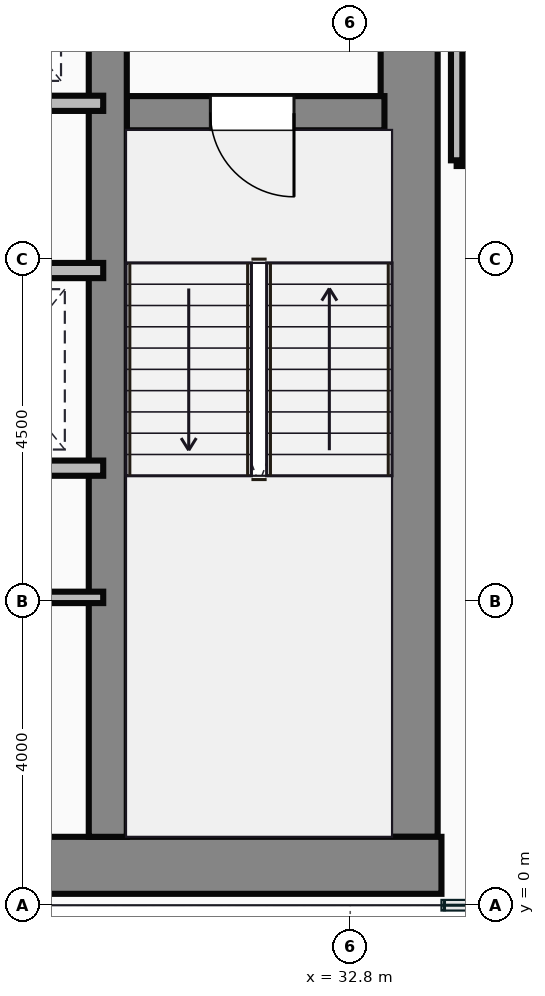
"""IFC4 building model, lengths in metres.
Left out: names, types, materials, properties, quantities, classifications, styles, units other than length and angle.
Written with IfcOpenShell. Run it as: python <this file> out.ifc"""

import sys

from ifc_helpers import new_model, si_unit, direction, frame, frame_2d, origin, place, context, subcontext, project, spatial, rectangle, extrude, source, transform, mapped, element, fill, save


model = new_model("IFC4")
c1 = context("Model", 3, precision=1e-05, world=origin(), true_north=direction((0.0, 1.0)))
c2 = subcontext(c1, "Body", "Model", "MODEL_VIEW")
j1 = project(units=[si_unit("LENGTHUNIT", "METRE"), si_unit("PLANEANGLEUNIT", "RADIAN")], contexts=[c1])
p1 = place(None, origin())
s1 = spatial("IfcSite", under=j1, at=p1, CompositionType="ELEMENT")
p2 = place(p1, origin())
s2 = spatial("IfcBuilding", under=s1, at=p2, CompositionType="ELEMENT")
p3 = place(p2, frame((0.0, 0.0, 180.75)))
s3 = spatial("IfcBuildingStorey", under=s2, at=p3, CompositionType="ELEMENT", Elevation=180.75)
m1 = source(origin(), c2, "Body", "SweptSolid", [
    extrude(rectangle(XDim=29.5, YDim=0.75, at=frame_2d((14.75, 0.0))), origin(), (0.0, 0.0, 1.0), 3.65),
])
p4 = place(p3, frame((4.5, 0.525, 0.0), z_axis=(0.0, 0.0, 1.0), x_axis=(1.0, 0.0, 0.0)))
e1 = element("IfcWall", 1, at=p4, inside=s3, PredefinedType="SHEAR", context=c2, shape_type="MappedRepresentation", body=[
    mapped(m1, transform((0.0, 0.0, 0.0))),
])
m2 = source(origin(), c2, "Body", "SweptSolid", [
    extrude(rectangle(XDim=13.1, YDim=0.75, at=frame_2d((6.55, 0.0))), origin(), (0.0, 0.0, 1.0), 3.65),
])
p5 = place(p3, frame((33.575, 0.9, 0.0), z_axis=(0.0, 0.0, 1.0), x_axis=(0.0, 1.0, 0.0)))
e2 = element("IfcWall", 2, at=p5, inside=s3, PredefinedType="SHEAR", context=c2, shape_type="MappedRepresentation", body=[
    mapped(m2, transform((0.0, 0.0, 0.0))),
])
m3 = source(origin(), c2, "Body", "SweptSolid", [
    extrude(rectangle(XDim=12.35, YDim=0.5, at=frame_2d((6.175, 0.0))), origin(), (0.0, 0.0, 1.0), 3.65),
])
p6 = place(p3, frame((29.61, 0.9, 0.0), z_axis=(0.0, 0.0, 1.0), x_axis=(0.0, 1.0, 0.0)))
e3 = element("IfcWall", 3, at=p6, inside=s3, PredefinedType="SHEAR", context=c2, shape_type="MappedRepresentation", body=[
    mapped(m3, transform((0.0, 0.0, 0.0))),
])
m4 = source(origin(), c2, "Body", "SweptSolid", [
    extrude(rectangle(XDim=3.39, YDim=0.45, at=frame_2d((1.695, 0.0))), origin(), (0.0, 0.0, 1.0), 3.65),
])
p7 = place(p3, frame((29.86, 10.42, 0.0), z_axis=(0.0, 0.0, 1.0), x_axis=(1.0, 0.0, 0.0)))
e4 = element("IfcWall", 4, at=p7, inside=s3, PredefinedType="SHEAR", context=c2, shape_type="MappedRepresentation", body=[
    mapped(m4, transform((0.0, 0.0, 0.0))),
])
p8 = place(p7, frame((1.1, 0.0, 0.0)))
e5 = element("IfcOpeningElement", 5, at=p8, cuts=e4, PredefinedType="OPENING", context=c2, shape_type="SweptSolid", body=[
    extrude(rectangle(XDim=1.1, YDim=2.15, at=frame_2d((0.55, 1.075))), frame((0.0, 0.235, 0.0), z_axis=(0.0, -1.0, 0.0), x_axis=(1.0, 0.0, 0.0)), (0.0, 0.0, 1.0), 0.47),
])
m5 = source(origin(), c2, "Body", "SweptSolid", [
    extrude(rectangle(XDim=8.8, YDim=0.2, at=frame_2d((4.4, 0.0))), origin(), (0.0, 0.0, 1.0), 3.4),
])
p9 = place(p3, frame((20.75, 10.55, 0.0), z_axis=(0.0, 0.0, 1.0), x_axis=(1.0, 0.0, 0.0)))
e6 = element("IfcWall", 6, at=p9, inside=s3, PredefinedType="PARTITIONING", context=c2, shape_type="MappedRepresentation", body=[
    mapped(m5, transform((0.0, 0.0, 0.0))),
])
m6 = source(origin(), c2, "Body", "SweptSolid", [
    extrude(rectangle(XDim=4.55, YDim=0.2, at=frame_2d((2.275, 0.0))), origin(), (0.0, 0.0, 1.0), 3.4),
])
for number, where, z_axis, x_axis in (
    (7, (25.0, 8.35, 0.0), (0.0, 0.0, 1.0), (1.0, 0.0, 0.0)),
    (8, (25.0, 5.75, 0.0), (0.0, 0.0, 1.0), (1.0, 0.0, 0.0)),
):
    element("IfcWall", number, at=place(p3, frame(where, z_axis=z_axis, x_axis=x_axis)), inside=s3, PredefinedType="PARTITIONING", context=c2, shape_type="MappedRepresentation", body=[
        mapped(m6, transform((0.0, 0.0, 0.0))),
    ])
m7 = source(origin(), c2, "Body", "SweptSolid", [
    extrude(rectangle(XDim=4.55, YDim=0.15, at=frame_2d((2.275, 0.0))), origin(), (0.0, 0.0, 1.0), 3.4),
])
p10 = place(p3, frame((25.0, 4.05, 0.0), z_axis=(0.0, 0.0, 1.0), x_axis=(1.0, 0.0, 0.0)))
e9 = element("IfcWall", 9, at=p10, inside=s3, PredefinedType="PARTITIONING", context=c2, shape_type="MappedRepresentation", body=[
    mapped(m7, transform((0.0, 0.0, 0.0))),
])
m8 = source(origin(), c2, "Body", "SweptSolid", [
    extrude(rectangle(XDim=4.8, YDim=0.15, at=frame_2d((2.4, 0.0))), origin(), (0.0, 0.0, 1.0), 3.4),
])
p11 = place(p3, frame((34.2, 9.8, 0.0), z_axis=(0.0, 0.0, 1.0), x_axis=(1.0, 0.0, 0.0)))
e10 = element("IfcWall", 10, at=p11, inside=s3, PredefinedType="PARTITIONING", context=c2, shape_type="MappedRepresentation", body=[
    mapped(m8, transform((0.0, 0.0, 0.0))),
])
m9 = source(origin(), c2, "Body", "SweptSolid", [
    extrude(rectangle(XDim=4.18, YDim=0.15, at=frame_2d((2.09, 0.0))), origin(), (0.0, 0.0, 1.0), 3.4),
])
p12 = place(p3, frame((34.2, 9.8, 0.0), z_axis=(0.0, 0.0, 1.0), x_axis=(0.0, 1.0, 0.0)))
e11 = element("IfcWall", 11, at=p12, inside=s3, PredefinedType="PARTITIONING", context=c2, shape_type="MappedRepresentation", body=[
    mapped(m9, transform((0.0, 0.0, 0.0))),
])
m10 = source(origin(), c2, "Body", "SweptSolid", [
    extrude(rectangle(XDim=1.1, YDim=2.15, at=frame_2d((0.55, 1.075))), frame((0.0, 0.025, 0.0), z_axis=(0.0, -1.0, 0.0), x_axis=(1.0, 0.0, 0.0)), (0.0, 0.0, 1.0), 0.05),
])
p13 = place(p8, frame((1.1, 0.0, 0.0), z_axis=(0.0, 0.0, 1.0), x_axis=(-1.0, 0.0, 0.0)))
e12 = element("IfcDoor", 12, at=p13, inside=s3, OperationType="SINGLE_SWING_RIGHT", PredefinedType="DOOR", context=c2, shape_type="MappedRepresentation", body=[
    mapped(m10, transform((0.0, 0.0, 0.0))),
])
fill(e5, e12)
save(model, sys.argv[1])
